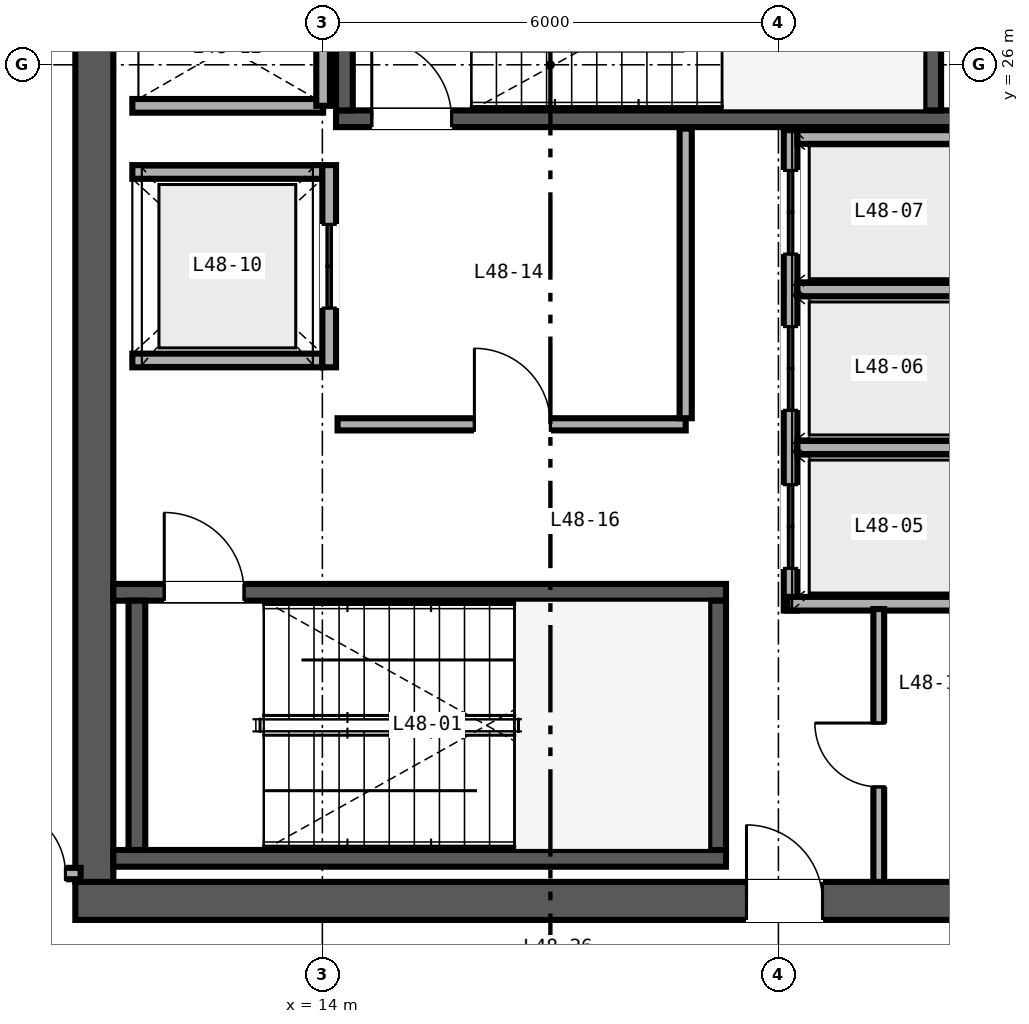
"""IFC4 building model, lengths in metres.
Left out: names, types, materials, properties, quantities, classifications, styles, units other than length and angle.
Written with IfcOpenShell. Run it as: python <this file> out.ifc"""

import sys

from ifc_helpers import new_model, si_unit, direction, frame, frame_2d, origin, place, context, subcontext, project, spatial, rectangle, extrude, source, transform, mapped, element, fill, save


model = new_model("IFC4")
c1 = context("Model", 3, precision=1e-05, world=origin(), true_north=direction((0.0, 1.0)))
c2 = subcontext(c1, "Body", "Model", "MODEL_VIEW")
j1 = project(units=[si_unit("LENGTHUNIT", "METRE"), si_unit("PLANEANGLEUNIT", "RADIAN")], contexts=[c1])
p1 = place(None, origin())
s1 = spatial("IfcSite", under=j1, at=p1, CompositionType="ELEMENT")
p2 = place(p1, origin())
s2 = spatial("IfcBuilding", under=s1, at=p2, CompositionType="ELEMENT")
p3 = place(p2, frame((0.0, 0.0, 192.0)))
s3 = spatial("IfcBuildingStorey", under=s2, at=p3, CompositionType="ELEMENT", Elevation=192.0)
p4 = place(p3, frame((10.75, 15.0, 0.0), z_axis=(0.0, 0.0, 1.0), x_axis=(1.0, 0.0, 0.0)))
e1 = element("IfcWall", 1, at=p4, inside=s3, PredefinedType="SHEAR", context=c2, shape_type="SweptSolid", body=[
    extrude(rectangle(XDim=12.5, YDim=0.5, at=frame_2d((6.25, 0.0))), origin(), (0.0, 0.0, 1.0), 3.37),
])
p5 = place(p4, frame((8.83, 0.0, 0.0)))
e2 = element("IfcOpeningElement", 2, at=p5, cuts=e1, PredefinedType="OPENING", context=c2, shape_type="SweptSolid", body=[
    extrude(rectangle(XDim=1.0, YDim=2.15, at=frame_2d((0.5, 1.075))), frame((0.0, 0.26, 0.0), z_axis=(0.0, -1.0, 0.0), x_axis=(1.0, 0.0, 0.0)), (0.0, 0.0, 1.0), 0.52),
])
p6 = place(p3, frame((11.0, 15.25, 0.0), z_axis=(0.0, 0.0, 1.0), x_axis=(0.0, 1.0, 0.0)))
e3 = element("IfcWall", 3, at=p6, inside=s3, PredefinedType="SHEAR", context=c2, shape_type="SweptSolid", body=[
    extrude(rectangle(XDim=21.5, YDim=0.5, at=frame_2d((10.75, 0.0))), origin(), (0.0, 0.0, 1.0), 3.37),
])
p7 = place(p3, frame((11.25, 15.56, 0.0), z_axis=(0.0, 0.0, 1.0), x_axis=(1.0, 0.0, 0.0)))
e4 = element("IfcWall", 4, at=p7, inside=s3, PredefinedType="SHEAR", context=c2, shape_type="SweptSolid", body=[
    extrude(rectangle(XDim=8.06, YDim=0.22, at=frame_2d((4.03, 0.0))), origin(), (0.0, 0.0, 1.0), 3.4),
])
p8 = place(p3, frame((11.25, 19.06, 0.0), z_axis=(0.0, 0.0, 1.0), x_axis=(1.0, 0.0, 0.0)))
e5 = element("IfcWall", 5, at=p8, inside=s3, PredefinedType="SHEAR", context=c2, shape_type="SweptSolid", body=[
    extrude(rectangle(XDim=8.06, YDim=0.22, at=frame_2d((4.03, 0.0))), origin(), (0.0, 0.0, 1.0), 3.4),
])
p9 = place(p8, frame((0.67, 0.0, 0.0)))
e6 = element("IfcOpeningElement", 6, at=p9, cuts=e5, PredefinedType="OPENING", context=c2, shape_type="SweptSolid", body=[
    extrude(rectangle(XDim=1.05, YDim=2.15, at=frame_2d((0.525, 1.075))), frame((0.0, 0.12, 0.0), z_axis=(0.0, -1.0, 0.0), x_axis=(1.0, 0.0, 0.0)), (0.0, 0.0, 1.0), 0.24),
])
for number, where, z_axis, x_axis in (
    (7, (11.56, 15.67, 0.0), (0.0, 0.0, 1.0), (0.0, 1.0, 0.0)),
    (8, (19.2, 15.67, 0.0), (0.0, 0.0, 1.0), (0.0, 1.0, 0.0)),
):
    element("IfcWall", number, at=place(p3, frame(where, z_axis=z_axis, x_axis=x_axis)), inside=s3, PredefinedType="SHEAR", context=c2, shape_type="SweptSolid", body=[
        extrude(rectangle(XDim=3.28, YDim=0.22, at=frame_2d((1.64, 0.0))), origin(), (0.0, 0.0, 1.0), 3.4),
    ])
p10 = place(p3, frame((14.18, 25.29, 0.0), z_axis=(0.0, 0.0, 1.0), x_axis=(1.0, 0.0, 0.0)))
e9 = element("IfcWall", 9, at=p10, inside=s3, PredefinedType="SHEAR", context=c2, shape_type="SweptSolid", body=[
    extrude(rectangle(XDim=8.57, YDim=0.22, at=frame_2d((4.285, 0.0))), origin(), (0.0, 0.0, 1.0), 3.4),
])
p11 = place(p10, frame((0.47, 0.0, 0.0)))
e10 = element("IfcOpeningElement", 10, at=p11, cuts=e9, PredefinedType="OPENING", context=c2, shape_type="SweptSolid", body=[
    extrude(rectangle(XDim=1.05, YDim=2.15, at=frame_2d((0.525, 1.075))), frame((0.0, 0.12, 0.0), z_axis=(0.0, -1.0, 0.0), x_axis=(1.0, 0.0, 0.0)), (0.0, 0.0, 1.0), 0.24),
])
for number, where, z_axis, x_axis in (
    (11, (14.29, 25.4, 0.0), (0.0, 0.0, 1.0), (0.0, 1.0, 0.0)),
    (12, (22.03, 25.4, 0.0), (0.0, 0.0, 1.0), (0.0, 1.0, 0.0)),
):
    element("IfcWall", number, at=place(p3, frame(where, z_axis=z_axis, x_axis=x_axis)), inside=s3, PredefinedType="SHEAR", context=c2, shape_type="SweptSolid", body=[
        extrude(rectangle(XDim=3.28, YDim=0.22, at=frame_2d((1.64, 0.0))), origin(), (0.0, 0.0, 1.0), 3.4),
    ])
p12 = place(p3, frame((20.16, 18.82, 0.0), z_axis=(0.0, 0.0, 1.0), x_axis=(0.0, 1.0, 0.0)))
e13 = element("IfcWall", 13, at=p12, inside=s3, PredefinedType="SOLIDWALL", context=c2, shape_type="SweptSolid", body=[
    extrude(rectangle(XDim=6.32, YDim=0.18, at=frame_2d((3.16, 0.0))), origin(), (0.0, 0.0, 1.0), 2.47),
])
p13 = place(p12, frame((0.555, 0.0, 0.0)))
e14 = element("IfcOpeningElement", 14, at=p13, cuts=e13, PredefinedType="OPENING", context=c2, shape_type="SweptSolid", body=[
    extrude(rectangle(XDim=1.1, YDim=2.2, at=frame_2d((0.55, 1.1))), frame((0.0, 0.1, 0.0), z_axis=(0.0, -1.0, 0.0), x_axis=(1.0, 0.0, 0.0)), (0.0, 0.0, 1.0), 0.2),
])
p14 = place(p12, frame((2.635, 0.0, 0.0)))
e15 = element("IfcOpeningElement", 15, at=p14, cuts=e13, PredefinedType="OPENING", context=c2, shape_type="SweptSolid", body=[
    extrude(rectangle(XDim=1.1, YDim=2.2, at=frame_2d((0.55, 1.1))), frame((0.0, 0.1, 0.0), z_axis=(0.0, -1.0, 0.0), x_axis=(1.0, 0.0, 0.0)), (0.0, 0.0, 1.0), 0.2),
])
p15 = place(p12, frame((4.69, 0.0, 0.0)))
e16 = element("IfcOpeningElement", 16, at=p15, cuts=e13, PredefinedType="OPENING", context=c2, shape_type="SweptSolid", body=[
    extrude(rectangle(XDim=1.1, YDim=2.2, at=frame_2d((0.55, 1.1))), frame((0.0, 0.1, 0.0), z_axis=(0.0, -1.0, 0.0), x_axis=(1.0, 0.0, 0.0)), (0.0, 0.0, 1.0), 0.2),
])
p16 = place(p3, frame((20.12, 18.91, 0.0), z_axis=(0.0, 0.0, 1.0), x_axis=(1.0, 0.0, 0.0)))
e17 = element("IfcWall", 17, at=p16, inside=s3, PredefinedType="SOLIDWALL", context=c2, shape_type="SweptSolid", body=[
    extrude(rectangle(XDim=2.63, YDim=0.18, at=frame_2d((1.315, 0.0))), origin(), (0.0, 0.0, 1.0), 3.37),
])
p17 = place(p3, frame((20.25, 25.05, 0.0), z_axis=(0.0, 0.0, 1.0), x_axis=(1.0, 0.0, 0.0)))
e18 = element("IfcWall", 18, at=p17, inside=s3, PredefinedType="SOLIDWALL", context=c2, shape_type="SweptSolid", body=[
    extrude(rectangle(XDim=2.36, YDim=0.18, at=frame_2d((1.18, 0.0))), origin(), (0.0, 0.0, 1.0), 3.37),
])
p18 = place(p3, frame((20.25, 20.965, 0.0), z_axis=(0.0, 0.0, 1.0), x_axis=(1.0, 0.0, 0.0)))
e19 = element("IfcWall", 19, at=p18, inside=s3, PredefinedType="SOLIDWALL", context=c2, shape_type="SweptSolid", body=[
    extrude(rectangle(XDim=2.36, YDim=0.18, at=frame_2d((1.18, 0.0))), origin(), (0.0, 0.0, 1.0), 2.47),
])
p19 = place(p3, frame((20.25, 23.045, 0.0), z_axis=(0.0, 0.0, 1.0), x_axis=(1.0, 0.0, 0.0)))
e20 = element("IfcWall", 20, at=p19, inside=s3, PredefinedType="SOLIDWALL", context=c2, shape_type="SweptSolid", body=[
    extrude(rectangle(XDim=2.36, YDim=0.18, at=frame_2d((1.18, 0.0))), origin(), (0.0, 0.0, 1.0), 3.37),
])
for number, where, z_axis, x_axis in (
    (21, (11.5, 22.11, 0.0), (0.0, 0.0, 1.0), (1.0, 0.0, 0.0)),
    (22, (11.5, 24.59, 0.0), (0.0, 0.0, 1.0), (1.0, 0.0, 0.0)),
):
    element("IfcWall", number, at=place(p3, frame(where, z_axis=z_axis, x_axis=x_axis)), inside=s3, PredefinedType="SOLIDWALL", context=c2, shape_type="SweptSolid", body=[
        extrude(rectangle(XDim=2.5, YDim=0.18, at=frame_2d((1.25, 0.0))), origin(), (0.0, 0.0, 1.0), 3.37),
    ])
p20 = place(p3, frame((14.09, 22.02, 0.0), z_axis=(0.0, 0.0, 1.0), x_axis=(0.0, 1.0, 0.0)))
e23 = element("IfcWall", 23, at=p20, inside=s3, PredefinedType="SOLIDWALL", context=c2, shape_type="SweptSolid", body=[
    extrude(rectangle(XDim=2.66, YDim=0.18, at=frame_2d((1.33, 0.0))), origin(), (0.0, 0.0, 1.0), 3.37),
])
p21 = place(p20, frame((0.78, 0.0, 0.0)))
e24 = element("IfcOpeningElement", 24, at=p21, cuts=e23, PredefinedType="OPENING", context=c2, shape_type="SweptSolid", body=[
    extrude(rectangle(XDim=1.1, YDim=2.2, at=frame_2d((0.55, 1.1))), frame((0.0, 0.1, 0.0), z_axis=(0.0, -1.0, 0.0), x_axis=(1.0, 0.0, 0.0)), (0.0, 0.0, 1.0), 0.2),
])
p22 = place(p3, frame((11.5, 25.46, 0.0), z_axis=(0.0, 0.0, 1.0), x_axis=(1.0, 0.0, 0.0)))
e25 = element("IfcWall", 25, at=p22, inside=s3, PredefinedType="SOLIDWALL", context=c2, shape_type="SweptSolid", body=[
    extrude(rectangle(XDim=2.51, YDim=0.18, at=frame_2d((1.255, 0.0))), origin(), (0.0, 0.0, 1.0), 3.37),
])
p23 = place(p3, frame((14.01, 25.46, 0.0), z_axis=(0.0, 0.0, 1.0), x_axis=(0.0, 1.0, 0.0)))
e26 = element("IfcWall", 26, at=p23, inside=s3, PredefinedType="SOLIDWALL", context=c2, shape_type="SweptSolid", body=[
    extrude(rectangle(XDim=3.08, YDim=0.18, at=frame_2d((1.54, 0.0))), origin(), (0.0, 0.0, 1.0), 3.37),
])
p24 = place(p3, frame((14.2, 21.27, 0.0), z_axis=(0.0, 0.0, 1.0), x_axis=(1.0, 0.0, 0.0)))
e27 = element("IfcWall", 27, at=p24, inside=s3, PredefinedType="PARTITIONING", context=c2, shape_type="SweptSolid", body=[
    extrude(rectangle(XDim=4.58, YDim=0.16, at=frame_2d((2.29, 0.0))), origin(), (0.0, 0.0, 1.0), 3.37),
])
p25 = place(p24, frame((1.8, 0.0, 0.0)))
e28 = element("IfcOpeningElement", 28, at=p25, cuts=e27, PredefinedType="OPENING", context=c2, shape_type="SweptSolid", body=[
    extrude(rectangle(XDim=1.0, YDim=2.15, at=frame_2d((0.5, 1.075))), frame((0.0, 0.09, 0.0), z_axis=(0.0, -1.0, 0.0), x_axis=(1.0, 0.0, 0.0)), (0.0, 0.0, 1.0), 0.18),
])
p26 = place(p3, frame((18.78, 21.35, 0.0), z_axis=(0.0, 0.0, 1.0), x_axis=(0.0, 1.0, 0.0)))
e29 = element("IfcWall", 29, at=p26, inside=s3, PredefinedType="PARTITIONING", context=c2, shape_type="SweptSolid", body=[
    extrude(rectangle(XDim=3.81, YDim=0.16, at=frame_2d((1.905, 0.0))), origin(), (0.0, 0.0, 1.0), 3.37),
])
p27 = place(p3, frame((21.32, 15.25, 0.0), z_axis=(0.0, 0.0, 1.0), x_axis=(0.0, 1.0, 0.0)))
e30 = element("IfcWall", 30, at=p27, inside=s3, PredefinedType="PARTITIONING", context=c2, shape_type="SweptSolid", body=[
    extrude(rectangle(XDim=3.59, YDim=0.142, at=frame_2d((1.795, 0.0))), origin(), (0.0, 0.0, 1.0), 3.37),
])
p28 = place(p27, frame((1.25, 0.0, 0.0)))
e31 = element("IfcOpeningElement", 31, at=p28, cuts=e30, PredefinedType="OPENING", context=c2, shape_type="SweptSolid", body=[
    extrude(rectangle(XDim=0.84, YDim=2.1, at=frame_2d((0.42, 1.05))), frame((0.0, 0.081, 0.0), z_axis=(0.0, -1.0, 0.0), x_axis=(1.0, 0.0, 0.0)), (0.0, 0.0, 1.0), 0.162),
])
p29 = place(p3, frame((8.16, 15.36, 0.0), z_axis=(0.0, 0.0, 1.0), x_axis=(1.0, 0.0, 0.0)))
e32 = element("IfcWall", 32, at=p29, inside=s3, PredefinedType="PARTITIONING", context=c2, shape_type="SweptSolid", body=[
    extrude(rectangle(XDim=2.66, YDim=0.15, at=frame_2d((1.33, 0.0))), origin(), (0.0, 0.0, 1.0), 2.591),
])
p30 = place(p29, frame((1.58, 0.0, 0.0)))
e33 = element("IfcOpeningElement", 33, at=p30, cuts=e32, PredefinedType="OPENING", context=c2, shape_type="SweptSolid", body=[
    extrude(rectangle(XDim=0.88, YDim=2.15, at=frame_2d((0.44, 1.075))), frame((0.0, 0.085, 0.0), z_axis=(0.0, -1.0, 0.0), x_axis=(1.0, 0.0, 0.0)), (0.0, 0.0, 1.0), 0.17),
])
m1 = source(origin(), c2, "Body", "SweptSolid", [
    extrude(rectangle(XDim=1.05, YDim=2.15, at=frame_2d((0.525, 1.075))), frame((0.0, 0.025, 0.0), z_axis=(0.0, -1.0, 0.0), x_axis=(1.0, 0.0, 0.0)), (0.0, 0.0, 1.0), 0.05),
])
p31 = place(p9, origin())
e34 = element("IfcDoor", 34, at=p31, inside=s3, OperationType="SINGLE_SWING_LEFT", PredefinedType="DOOR", context=c2, shape_type="MappedRepresentation", body=[
    mapped(m1, transform((0.0, 0.0, 0.0), scale=1.0)),
])
fill(e6, e34)
p32 = place(p11, origin())
e35 = element("IfcDoor", 35, at=p32, inside=s3, OperationType="SINGLE_SWING_LEFT", PredefinedType="DOOR", context=c2, shape_type="MappedRepresentation", body=[
    mapped(m1, transform((0.0, 0.0, 0.0), scale=1.0)),
])
fill(e10, e35)
m2 = source(origin(), c2, "Body", "SweptSolid", [
    extrude(rectangle(XDim=1.1, YDim=2.2, at=frame_2d((0.55, 1.1))), frame((0.0, 0.025, 0.0), z_axis=(0.0, -1.0, 0.0), x_axis=(1.0, 0.0, 0.0)), (0.0, 0.0, 1.0), 0.05),
])
p33 = place(p13, origin())
e36 = element("IfcDoor", 36, at=p33, inside=s3, OperationType="DOUBLE_DOOR_SLIDING", PredefinedType="DOOR", context=c2, shape_type="MappedRepresentation", body=[
    mapped(m2, transform((0.0, 0.0, 0.0), scale=1.0)),
])
fill(e14, e36)
p34 = place(p14, origin())
e37 = element("IfcDoor", 37, at=p34, inside=s3, OperationType="DOUBLE_DOOR_SLIDING", PredefinedType="DOOR", context=c2, shape_type="MappedRepresentation", body=[
    mapped(m2, transform((0.0, 0.0, 0.0), scale=1.0)),
])
fill(e15, e37)
p35 = place(p15, origin())
e38 = element("IfcDoor", 38, at=p35, inside=s3, OperationType="DOUBLE_DOOR_SLIDING", PredefinedType="DOOR", context=c2, shape_type="MappedRepresentation", body=[
    mapped(m2, transform((0.0, 0.0, 0.0), scale=1.0)),
])
fill(e16, e38)
p36 = place(p21, origin())
e39 = element("IfcDoor", 39, at=p36, inside=s3, OperationType="DOUBLE_DOOR_SLIDING", PredefinedType="DOOR", context=c2, shape_type="MappedRepresentation", body=[
    mapped(m2, transform((0.0, 0.0, 0.0), scale=1.0)),
])
fill(e24, e39)
m3 = source(origin(), c2, "Body", "SweptSolid", [
    extrude(rectangle(XDim=1.0, YDim=2.15, at=frame_2d((0.5, 1.075))), frame((0.0, 0.025, 0.0), z_axis=(0.0, -1.0, 0.0), x_axis=(1.0, 0.0, 0.0)), (0.0, 0.0, 1.0), 0.05),
])
p37 = place(p25, origin())
e40 = element("IfcDoor", 40, at=p37, inside=s3, OperationType="SINGLE_SWING_LEFT", PredefinedType="DOOR", context=c2, shape_type="MappedRepresentation", body=[
    mapped(m3, transform((0.0, 0.0, 0.0), scale=1.0)),
])
fill(e28, e40)
m4 = source(origin(), c2, "Body", "SweptSolid", [
    extrude(rectangle(XDim=0.84, YDim=2.1, at=frame_2d((0.42, 1.05))), frame((0.0, 0.025, 0.0), z_axis=(0.0, -1.0, 0.0), x_axis=(1.0, 0.0, 0.0)), (0.0, 0.0, 1.0), 0.05),
])
p38 = place(p28, origin())
e41 = element("IfcDoor", 41, at=p38, inside=s3, OperationType="SINGLE_SWING_RIGHT", PredefinedType="DOOR", context=c2, shape_type="MappedRepresentation", body=[
    mapped(m4, transform((0.0, 0.0, 0.0), scale=1.0)),
])
fill(e31, e41)
p39 = place(p5, origin())
e42 = element("IfcDoor", 42, at=p39, inside=s3, OperationType="SINGLE_SWING_LEFT", PredefinedType="DOOR", context=c2, shape_type="MappedRepresentation", body=[
    mapped(m3, transform((0.0, 0.0, 0.0), scale=1.0)),
])
fill(e2, e42)
m5 = source(origin(), c2, "Body", "SweptSolid", [
    extrude(rectangle(XDim=0.88, YDim=2.15, at=frame_2d((0.44, 1.075))), frame((0.0, 0.025, 0.0), z_axis=(0.0, -1.0, 0.0), x_axis=(1.0, 0.0, 0.0)), (0.0, 0.0, 1.0), 0.05),
])
p40 = place(p30, origin())
e43 = element("IfcDoor", 43, at=p40, inside=s3, OperationType="SINGLE_SWING_LEFT", PredefinedType="DOOR", context=c2, shape_type="MappedRepresentation", body=[
    mapped(m5, transform((0.0, 0.0, 0.0), scale=1.0)),
])
fill(e33, e43)
save(model, sys.argv[1])
